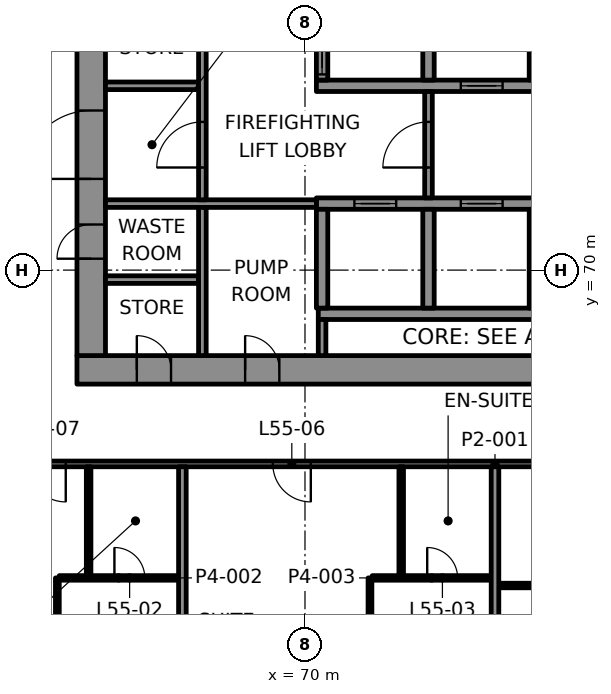
"""IFC4 building model, lengths in metres.
Left out: names, types, materials, properties, quantities, classifications, styles, units other than length and angle.
Written with IfcOpenShell. Run it as: python <this file> out.ifc"""

import sys

from ifc_helpers import new_model, si_unit, direction, frame, frame_2d, origin, place, context, subcontext, project, spatial, rectangle, extrude, element, fill, save


model = new_model("IFC4")
c1 = context("Model", 3, precision=1e-05, world=origin(), true_north=direction((0.0, 1.0)))
c2 = subcontext(c1, "Body", "Model", "MODEL_VIEW")
j1 = project(units=[si_unit("LENGTHUNIT", "METRE"), si_unit("PLANEANGLEUNIT", "RADIAN")], contexts=[c1])
p1 = place(None, origin())
s1 = spatial("IfcSite", under=j1, at=p1, CompositionType="ELEMENT")
p2 = place(p1, origin())
s2 = spatial("IfcBuilding", under=s1, at=p2, CompositionType="ELEMENT")
p3 = place(p2, frame((0.0, 0.0, 233.8)))
s3 = spatial("IfcBuildingStorey", under=s2, at=p3, CompositionType="ELEMENT", Elevation=233.8)
p4 = place(p3, frame((64.0, 67.375, 0.0), z_axis=(0.0, 0.0, 1.0), x_axis=(1.0, 0.0, 0.0)))
e1 = element("IfcWall", 1, at=p4, inside=s3, PredefinedType="SHEAR", context=c2, shape_type="SweptSolid", body=[
    extrude(rectangle(XDim=22.0, YDim=0.75, at=frame_2d((11.0, 0.0))), origin(), (0.0, 0.0, 1.0), 3.7),
])
p5 = place(p4, frame((1.575, 0.0, 0.0)))
e2 = element("IfcOpeningElement", 2, at=p5, cuts=e1, PredefinedType="OPENING", context=c2, shape_type="SweptSolid", body=[
    extrude(rectangle(XDim=0.9, YDim=2.1, at=frame_2d((0.45, 1.05))), frame((0.0, 0.385, 0.0), z_axis=(0.0, -1.0, 0.0), x_axis=(1.0, 0.0, 0.0)), (0.0, 0.0, 1.0), 0.77),
])
p6 = place(p4, frame((4.425, 0.0, 0.0)))
e3 = element("IfcOpeningElement", 3, at=p6, cuts=e1, PredefinedType="OPENING", context=c2, shape_type="SweptSolid", body=[
    extrude(rectangle(XDim=0.9, YDim=2.1, at=frame_2d((0.45, 1.05))), frame((0.0, 0.385, 0.0), z_axis=(0.0, -1.0, 0.0), x_axis=(1.0, 0.0, 0.0)), (0.0, 0.0, 1.0), 0.77),
])
p7 = place(p3, frame((64.375, 67.75, 0.0), z_axis=(0.0, 0.0, 1.0), x_axis=(0.0, 1.0, 0.0)))
e4 = element("IfcWall", 4, at=p7, inside=s3, PredefinedType="SHEAR", context=c2, shape_type="SweptSolid", body=[
    extrude(rectangle(XDim=14.5, YDim=0.75, at=frame_2d((7.25, 0.0))), origin(), (0.0, 0.0, 1.0), 3.7),
])
p8 = place(p7, frame((4.65, 0.0, 0.0)))
e5 = element("IfcOpeningElement", 5, at=p8, cuts=e4, PredefinedType="OPENING", context=c2, shape_type="SweptSolid", body=[
    extrude(rectangle(XDim=1.8, YDim=2.1, at=frame_2d((0.9, 1.05))), frame((0.0, 0.385, 0.0), z_axis=(0.0, -1.0, 0.0), x_axis=(1.0, 0.0, 0.0)), (0.0, 0.0, 1.0), 0.77),
])
p9 = place(p7, frame((2.55, 0.0, 0.0)))
e6 = element("IfcOpeningElement", 6, at=p9, cuts=e4, PredefinedType="OPENING", context=c2, shape_type="SweptSolid", body=[
    extrude(rectangle(XDim=0.9, YDim=2.1, at=frame_2d((0.45, 1.05))), frame((0.0, 0.385, 0.0), z_axis=(0.0, -1.0, 0.0), x_axis=(1.0, 0.0, 0.0)), (0.0, 0.0, 1.0), 0.77),
])
p10 = place(p7, frame((10.35, 0.0, 0.0)))
e7 = element("IfcOpeningElement", 7, at=p10, cuts=e4, PredefinedType="OPENING", context=c2, shape_type="SweptSolid", body=[
    extrude(rectangle(XDim=0.9, YDim=2.1, at=frame_2d((0.45, 1.05))), frame((0.0, 0.385, 0.0), z_axis=(0.0, -1.0, 0.0), x_axis=(1.0, 0.0, 0.0)), (0.0, 0.0, 1.0), 0.77),
])
p11 = place(p3, frame((70.35, 68.85, 0.0), z_axis=(0.0, 0.0, 1.0), x_axis=(1.0, 0.0, 0.0)))
e8 = element("IfcWall", 8, at=p11, inside=s3, PredefinedType="SHEAR", context=c2, shape_type="SweptSolid", body=[
    extrude(rectangle(XDim=14.2, YDim=0.3, at=frame_2d((7.1, 0.0))), origin(), (0.0, 0.0, 1.0), 3.7),
])
p12 = place(p3, frame((70.3, 71.75, 0.0), z_axis=(0.0, 0.0, 1.0), x_axis=(1.0, 0.0, 0.0)))
e9 = element("IfcWall", 9, at=p12, inside=s3, PredefinedType="SHEAR", context=c2, shape_type="SweptSolid", body=[
    extrude(rectangle(XDim=14.3, YDim=0.3, at=frame_2d((7.15, 0.0))), origin(), (0.0, 0.0, 1.0), 3.7),
])
p13 = place(p12, frame((1.0, 0.0, 0.0)))
e10 = element("IfcOpeningElement", 10, at=p13, cuts=e9, PredefinedType="OPENING", context=c2, shape_type="SweptSolid", body=[
    extrude(rectangle(XDim=1.1, YDim=2.1, at=frame_2d((0.55, 1.05))), frame((0.0, 0.16, 0.0), z_axis=(0.0, -1.0, 0.0), x_axis=(1.0, 0.0, 0.0)), (0.0, 0.0, 1.0), 0.32),
])
p14 = place(p12, frame((3.8, 0.0, 0.0)))
e11 = element("IfcOpeningElement", 11, at=p14, cuts=e9, PredefinedType="OPENING", context=c2, shape_type="SweptSolid", body=[
    extrude(rectangle(XDim=1.1, YDim=2.1, at=frame_2d((0.55, 1.05))), frame((0.0, 0.16, 0.0), z_axis=(0.0, -1.0, 0.0), x_axis=(1.0, 0.0, 0.0)), (0.0, 0.0, 1.0), 0.32),
])
p15 = place(p12, frame((6.6, 0.0, 0.0)))
e12 = element("IfcOpeningElement", 12, at=p15, cuts=e9, PredefinedType="OPENING", context=c2, shape_type="SweptSolid", body=[
    extrude(rectangle(XDim=1.1, YDim=2.1, at=frame_2d((0.55, 1.05))), frame((0.0, 0.16, 0.0), z_axis=(0.0, -1.0, 0.0), x_axis=(1.0, 0.0, 0.0)), (0.0, 0.0, 1.0), 0.32),
])
p16 = place(p12, frame((9.4, 0.0, 0.0)))
e13 = element("IfcOpeningElement", 13, at=p16, cuts=e9, PredefinedType="OPENING", context=c2, shape_type="SweptSolid", body=[
    extrude(rectangle(XDim=1.1, YDim=2.1, at=frame_2d((0.55, 1.05))), frame((0.0, 0.16, 0.0), z_axis=(0.0, -1.0, 0.0), x_axis=(1.0, 0.0, 0.0)), (0.0, 0.0, 1.0), 0.32),
])
p17 = place(p12, frame((12.2, 0.0, 0.0)))
e14 = element("IfcOpeningElement", 14, at=p17, cuts=e9, PredefinedType="OPENING", context=c2, shape_type="SweptSolid", body=[
    extrude(rectangle(XDim=1.1, YDim=2.1, at=frame_2d((0.55, 1.05))), frame((0.0, 0.16, 0.0), z_axis=(0.0, -1.0, 0.0), x_axis=(1.0, 0.0, 0.0)), (0.0, 0.0, 1.0), 0.32),
])
p18 = place(p3, frame((70.3, 74.85, 0.0), z_axis=(0.0, 0.0, 1.0), x_axis=(1.0, 0.0, 0.0)))
e15 = element("IfcWall", 15, at=p18, inside=s3, PredefinedType="SHEAR", context=c2, shape_type="SweptSolid", body=[
    extrude(rectangle(XDim=14.3, YDim=0.3, at=frame_2d((7.15, 0.0))), origin(), (0.0, 0.0, 1.0), 3.7),
])
p19 = place(p18, frame((3.8, 0.0, 0.0)))
e16 = element("IfcOpeningElement", 16, at=p19, cuts=e15, PredefinedType="OPENING", context=c2, shape_type="SweptSolid", body=[
    extrude(rectangle(XDim=1.1, YDim=2.1, at=frame_2d((0.55, 1.05))), frame((0.0, 0.16, 0.0), z_axis=(0.0, -1.0, 0.0), x_axis=(1.0, 0.0, 0.0)), (0.0, 0.0, 1.0), 0.32),
])
p20 = place(p18, frame((12.2, 0.0, 0.0)))
e17 = element("IfcOpeningElement", 17, at=p20, cuts=e15, PredefinedType="OPENING", context=c2, shape_type="SweptSolid", body=[
    extrude(rectangle(XDim=1.1, YDim=2.1, at=frame_2d((0.55, 1.05))), frame((0.0, 0.16, 0.0), z_axis=(0.0, -1.0, 0.0), x_axis=(1.0, 0.0, 0.0)), (0.0, 0.0, 1.0), 0.32),
])
p21 = place(p3, frame((70.45, 69.0, 0.0), z_axis=(0.0, 0.0, 1.0), x_axis=(0.0, 1.0, 0.0)))
e18 = element("IfcWall", 18, at=p21, inside=s3, PredefinedType="SHEAR", context=c2, shape_type="SweptSolid", body=[
    extrude(rectangle(XDim=2.6, YDim=0.3, at=frame_2d((1.3, 0.0))), origin(), (0.0, 0.0, 1.0), 3.7),
])
p22 = place(p3, frame((70.45, 75.0, 0.0), z_axis=(0.0, 0.0, 1.0), x_axis=(0.0, 1.0, 0.0)))
e19 = element("IfcWall", 19, at=p22, inside=s3, PredefinedType="SHEAR", context=c2, shape_type="SweptSolid", body=[
    extrude(rectangle(XDim=2.6, YDim=0.3, at=frame_2d((1.3, 0.0))), origin(), (0.0, 0.0, 1.0), 3.7),
])
p23 = place(p22, frame((0.15, 0.0, 0.0)))
e20 = element("IfcOpeningElement", 20, at=p23, cuts=e19, PredefinedType="OPENING", context=c2, shape_type="SweptSolid", body=[
    extrude(rectangle(XDim=1.1, YDim=2.1, at=frame_2d((0.55, 1.05))), frame((0.0, 0.16, 0.0), z_axis=(0.0, -1.0, 0.0), x_axis=(1.0, 0.0, 0.0)), (0.0, 0.0, 1.0), 0.32),
])
for number, where, z_axis, x_axis in (
    (21, (73.25, 69.0, 0.0), (0.0, 0.0, 1.0), (0.0, 1.0, 0.0)),
    (22, (73.25, 75.0, 0.0), (0.0, 0.0, 1.0), (0.0, 1.0, 0.0)),
    (23, (76.05, 69.0, 0.0), (0.0, 0.0, 1.0), (0.0, 1.0, 0.0)),
    (24, (76.05, 75.0, 0.0), (0.0, 0.0, 1.0), (0.0, 1.0, 0.0)),
):
    element("IfcWall", number, at=place(p3, frame(where, z_axis=z_axis, x_axis=x_axis)), inside=s3, PredefinedType="SHEAR", context=c2, shape_type="SweptSolid", body=[
        extrude(rectangle(XDim=2.6, YDim=0.3, at=frame_2d((1.3, 0.0))), origin(), (0.0, 0.0, 1.0), 3.7),
    ])
p24 = place(p3, frame((75.1, 61.7, 0.0), z_axis=(0.0, 0.0, 1.0), x_axis=(1.0, 0.0, 0.0)))
e25 = element("IfcWall", 25, at=p24, inside=s3, PredefinedType="PARTITIONING", context=c2, shape_type="SweptSolid", body=[
    extrude(rectangle(XDim=3.601, YDim=0.12, at=frame_2d((1.801, 0.0))), origin(), (0.0, 0.0, 1.0), 3.1),
])
p25 = place(p24, frame((1.401, 0.0, 0.0)))
e26 = element("IfcOpeningElement", 26, at=p25, cuts=e25, PredefinedType="OPENING", context=c2, shape_type="SweptSolid", body=[
    extrude(rectangle(XDim=0.8, YDim=2.1, at=frame_2d((0.4, 1.05))), frame((0.0, 0.07, 0.0), z_axis=(0.0, -1.0, 0.0), x_axis=(1.0, 0.0, 0.0)), (0.0, 0.0, 1.0), 0.14),
])
p26 = place(p3, frame((63.534, 61.9, 0.0), z_axis=(0.0, 0.0, 1.0), x_axis=(1.0, 0.0, 0.0)))
e27 = element("IfcWall", 27, at=p26, inside=s3, PredefinedType="PARTITIONING", context=c2, shape_type="SweptSolid", body=[
    extrude(rectangle(XDim=3.13, YDim=0.12, at=frame_2d((1.565, 0.0))), origin(), (0.0, 0.0, 1.0), 3.1),
])
p27 = place(p26, frame((1.451, 0.0, 0.0)))
e28 = element("IfcOpeningElement", 28, at=p27, cuts=e27, PredefinedType="OPENING", context=c2, shape_type="SweptSolid", body=[
    extrude(rectangle(XDim=0.8, YDim=2.1, at=frame_2d((0.4, 1.05))), frame((0.0, 0.07, 0.0), z_axis=(0.0, -1.0, 0.0), x_axis=(1.0, 0.0, 0.0)), (0.0, 0.0, 1.0), 0.14),
])
p28 = place(p3, frame((71.77, 61.9, 0.0), z_axis=(0.0, 0.0, 1.0), x_axis=(1.0, 0.0, 0.0)))
e29 = element("IfcWall", 29, at=p28, inside=s3, PredefinedType="PARTITIONING", context=c2, shape_type="SweptSolid", body=[
    extrude(rectangle(XDim=3.13, YDim=0.12, at=frame_2d((1.565, 0.0))), origin(), (0.0, 0.0, 1.0), 3.1),
])
p29 = place(p28, frame((1.446, 0.0, 0.0)))
e30 = element("IfcOpeningElement", 30, at=p29, cuts=e29, PredefinedType="OPENING", context=c2, shape_type="SweptSolid", body=[
    extrude(rectangle(XDim=0.8, YDim=2.1, at=frame_2d((0.4, 1.05))), frame((0.0, 0.07, 0.0), z_axis=(0.0, -1.0, 0.0), x_axis=(1.0, 0.0, 0.0)), (0.0, 0.0, 1.0), 0.14),
])
p30 = place(p3, frame((88.099, 64.9, 0.0), z_axis=(0.0, 0.0, 1.0), x_axis=(-1.0, 0.0, 0.0)))
e31 = element("IfcWall", 31, at=p30, inside=s3, PredefinedType="PARTITIONING", context=c2, shape_type="SweptSolid", body=[
    extrude(rectangle(XDim=26.199, YDim=0.15, at=frame_2d((13.1, 0.0))), origin(), (0.0, 0.0, 1.0), 3.1),
])
p31 = place(p30, frame((2.088, 0.0, 0.0)))
e32 = element("IfcOpeningElement", 32, at=p31, cuts=e31, PredefinedType="OPENING", context=c2, shape_type="SweptSolid", body=[
    extrude(rectangle(XDim=0.9, YDim=2.1, at=frame_2d((0.45, 1.05))), frame((0.0, 0.085, 0.0), z_axis=(0.0, -1.0, 0.0), x_axis=(1.0, 0.0, 0.0)), (0.0, 0.0, 1.0), 0.17),
])
p32 = place(p30, frame((5.4, 0.0, 0.0)))
e33 = element("IfcOpeningElement", 33, at=p32, cuts=e31, PredefinedType="OPENING", context=c2, shape_type="SweptSolid", body=[
    extrude(rectangle(XDim=1.0, YDim=2.1, at=frame_2d((0.5, 1.05))), frame((0.0, 0.085, 0.0), z_axis=(0.0, -1.0, 0.0), x_axis=(1.0, 0.0, 0.0)), (0.0, 0.0, 1.0), 0.17),
])
p33 = place(p30, frame((17.946, 0.0, 0.0)))
e34 = element("IfcOpeningElement", 34, at=p33, cuts=e31, PredefinedType="OPENING", context=c2, shape_type="SweptSolid", body=[
    extrude(rectangle(XDim=1.0, YDim=2.1, at=frame_2d((0.5, 1.05))), frame((0.0, 0.085, 0.0), z_axis=(0.0, -1.0, 0.0), x_axis=(1.0, 0.0, 0.0)), (0.0, 0.0, 1.0), 0.17),
])
p34 = place(p30, frame((24.395, 0.0, 0.0)))
e35 = element("IfcOpeningElement", 35, at=p34, cuts=e31, PredefinedType="OPENING", context=c2, shape_type="SweptSolid", body=[
    extrude(rectangle(XDim=1.0, YDim=2.1, at=frame_2d((0.5, 1.05))), frame((0.0, 0.085, 0.0), z_axis=(0.0, -1.0, 0.0), x_axis=(1.0, 0.0, 0.0)), (0.0, 0.0, 1.0), 0.17),
])
p35 = place(p3, frame((75.0, 57.997, 0.0), z_axis=(0.0, 0.0, 1.0), x_axis=(0.0, 1.0, 0.0)))
e36 = element("IfcWall", 36, at=p35, inside=s3, PredefinedType="PARTITIONING", context=c2, shape_type="SweptSolid", body=[
    extrude(rectangle(XDim=6.828, YDim=0.2, at=frame_2d((3.414, 0.0))), origin(), (0.0, 0.0, 1.0), 3.1),
])
p36 = place(p3, frame((72.532, 61.96, 0.0), z_axis=(0.0, 0.0, 1.0), x_axis=(0.0, 1.0, 0.0)))
e37 = element("IfcWall", 37, at=p36, inside=s3, PredefinedType="PARTITIONING", context=c2, shape_type="SweptSolid", body=[
    extrude(rectangle(XDim=2.865, YDim=0.12, at=frame_2d((1.433, 0.0))), origin(), (0.0, 0.0, 1.0), 3.1),
])
p37 = place(p3, frame((71.71, 61.9, 0.0), z_axis=(0.0, 0.0, 1.0), x_axis=(0.0, -1.0, 0.0)))
e38 = element("IfcWall", 38, at=p37, inside=s3, PredefinedType="PARTITIONING", context=c2, shape_type="SweptSolid", body=[
    extrude(rectangle(XDim=5.364, YDim=0.1, at=frame_2d((2.682, 0.0))), origin(), (0.0, 0.0, 1.0), 3.022),
])
p38 = place(p37, frame((2.052, 0.0, 0.0)))
e39 = element("IfcOpeningElement", 39, at=p38, cuts=e38, PredefinedType="OPENING", context=c2, shape_type="SweptSolid", body=[
    extrude(rectangle(XDim=0.9, YDim=2.1, at=frame_2d((0.45, 1.05))), frame((0.0, 0.06, 0.0), z_axis=(0.0, -1.0, 0.0), x_axis=(1.0, 0.0, 0.0)), (0.0, 0.0, 1.0), 0.12),
])
p39 = place(p3, frame((66.774, 57.997, 0.0), z_axis=(0.0, 0.0, 1.0), x_axis=(0.0, 1.0, 0.0)))
e40 = element("IfcWall", 40, at=p39, inside=s3, PredefinedType="PARTITIONING", context=c2, shape_type="SweptSolid", body=[
    extrude(rectangle(XDim=6.828, YDim=0.2, at=frame_2d((3.414, 0.0))), origin(), (0.0, 0.0, 1.0), 3.1),
])
p40 = place(p3, frame((64.307, 61.96, 0.0), z_axis=(0.0, 0.0, 1.0), x_axis=(0.0, 1.0, 0.0)))
e41 = element("IfcWall", 41, at=p40, inside=s3, PredefinedType="PARTITIONING", context=c2, shape_type="SweptSolid", body=[
    extrude(rectangle(XDim=2.865, YDim=0.12, at=frame_2d((1.433, 0.0))), origin(), (0.0, 0.0, 1.0), 3.1),
])
p41 = place(p3, frame((63.484, 61.9, 0.0), z_axis=(0.0, 0.0, 1.0), x_axis=(0.0, -1.0, 0.0)))
e42 = element("IfcWall", 42, at=p41, inside=s3, PredefinedType="PARTITIONING", context=c2, shape_type="SweptSolid", body=[
    extrude(rectangle(XDim=5.364, YDim=0.1, at=frame_2d((2.682, 0.0))), origin(), (0.0, 0.0, 1.0), 3.022),
])
p42 = place(p41, frame((2.052, 0.0, 0.0)))
e43 = element("IfcOpeningElement", 43, at=p42, cuts=e42, PredefinedType="OPENING", context=c2, shape_type="SweptSolid", body=[
    extrude(rectangle(XDim=0.9, YDim=2.1, at=frame_2d((0.45, 1.05))), frame((0.0, 0.06, 0.0), z_axis=(0.0, -1.0, 0.0), x_axis=(1.0, 0.0, 0.0)), (0.0, 0.0, 1.0), 0.12),
])
p43 = place(p3, frame((64.75, 69.75, 0.0), z_axis=(0.0, 0.0, 1.0), x_axis=(1.0, 0.0, 0.0)))
e44 = element("IfcWall", 44, at=p43, inside=s3, PredefinedType="PARTITIONING", context=c2, shape_type="SweptSolid", body=[
    extrude(rectangle(XDim=2.45, YDim=0.2, at=frame_2d((1.225, 0.0))), origin(), (0.0, 0.0, 1.0), 3.7),
])
p44 = place(p3, frame((64.75, 71.75, 0.0), z_axis=(0.0, 0.0, 1.0), x_axis=(1.0, 0.0, 0.0)))
e45 = element("IfcWall", 45, at=p44, inside=s3, PredefinedType="PARTITIONING", context=c2, shape_type="SweptSolid", body=[
    extrude(rectangle(XDim=5.55, YDim=0.2, at=frame_2d((2.775, 0.0))), origin(), (0.0, 0.0, 1.0), 3.7),
])
p45 = place(p3, frame((64.75, 74.85, 0.0), z_axis=(0.0, 0.0, 1.0), x_axis=(1.0, 0.0, 0.0)))
e46 = element("IfcWall", 46, at=p45, inside=s3, PredefinedType="PARTITIONING", context=c2, shape_type="SweptSolid", body=[
    extrude(rectangle(XDim=2.45, YDim=0.2, at=frame_2d((1.225, 0.0))), origin(), (0.0, 0.0, 1.0), 3.7),
])
p46 = place(p3, frame((67.3, 67.75, 0.0), z_axis=(0.0, 0.0, 1.0), x_axis=(0.0, 1.0, 0.0)))
e47 = element("IfcWall", 47, at=p46, inside=s3, PredefinedType="PARTITIONING", context=c2, shape_type="SweptSolid", body=[
    extrude(rectangle(XDim=3.9, YDim=0.2, at=frame_2d((1.95, 0.0))), origin(), (0.0, 0.0, 1.0), 3.7),
])
p47 = place(p3, frame((67.3, 71.85, 0.0), z_axis=(0.0, 0.0, 1.0), x_axis=(0.0, 1.0, 0.0)))
e48 = element("IfcWall", 48, at=p47, inside=s3, PredefinedType="PARTITIONING", context=c2, shape_type="SweptSolid", body=[
    extrude(rectangle(XDim=5.75, YDim=0.2, at=frame_2d((2.875, 0.0))), origin(), (0.0, 0.0, 1.0), 3.7),
])
p48 = place(p47, frame((0.85, 0.0, 0.0)))
e49 = element("IfcOpeningElement", 49, at=p48, cuts=e48, PredefinedType="OPENING", context=c2, shape_type="SweptSolid", body=[
    extrude(rectangle(XDim=1.2, YDim=2.1, at=frame_2d((0.6, 1.05))), frame((0.0, 0.11, 0.0), z_axis=(0.0, -1.0, 0.0), x_axis=(1.0, 0.0, 0.0)), (0.0, 0.0, 1.0), 0.22),
])
p49 = place(p3, frame((70.45, 67.75, 0.0), z_axis=(0.0, 0.0, 1.0), x_axis=(0.0, 1.0, 0.0)))
e50 = element("IfcWall", 50, at=p49, inside=s3, PredefinedType="PARTITIONING", context=c2, shape_type="SweptSolid", body=[
    extrude(rectangle(XDim=0.95, YDim=0.2, at=frame_2d((0.475, 0.0))), origin(), (0.0, 0.0, 1.0), 3.7),
])
p50 = place(p3, frame((73.25, 71.9, 0.0), z_axis=(0.0, 0.0, 1.0), x_axis=(0.0, 1.0, 0.0)))
e51 = element("IfcWall", 51, at=p50, inside=s3, PredefinedType="PARTITIONING", context=c2, shape_type="SweptSolid", body=[
    extrude(rectangle(XDim=2.8, YDim=0.2, at=frame_2d((1.4, 0.0))), origin(), (0.0, 0.0, 1.0), 3.7),
])
p51 = place(p50, frame((0.8, 0.0, 0.0)))
e52 = element("IfcOpeningElement", 52, at=p51, cuts=e51, PredefinedType="OPENING", context=c2, shape_type="SweptSolid", body=[
    extrude(rectangle(XDim=1.2, YDim=2.1, at=frame_2d((0.6, 1.05))), frame((0.0, 0.11, 0.0), z_axis=(0.0, -1.0, 0.0), x_axis=(1.0, 0.0, 0.0)), (0.0, 0.0, 1.0), 0.22),
])
p52 = place(p27, origin())
e53 = element("IfcDoor", 53, at=p52, inside=s3, OperationType="SINGLE_SWING_RIGHT", PredefinedType="DOOR", context=c2, shape_type="SweptSolid", body=[
    extrude(rectangle(XDim=0.8, YDim=2.1, at=frame_2d((0.4, 1.05))), frame((0.0, 0.025, 0.0), z_axis=(0.0, -1.0, 0.0), x_axis=(1.0, 0.0, 0.0)), (0.0, 0.0, 1.0), 0.05),
])
fill(e28, e53)
p53 = place(p29, origin())
e54 = element("IfcDoor", 54, at=p53, inside=s3, OperationType="SINGLE_SWING_LEFT", PredefinedType="DOOR", context=c2, shape_type="SweptSolid", body=[
    extrude(rectangle(XDim=0.8, YDim=2.1, at=frame_2d((0.4, 1.05))), frame((0.0, 0.025, 0.0), z_axis=(0.0, -1.0, 0.0), x_axis=(1.0, 0.0, 0.0)), (0.0, 0.0, 1.0), 0.05),
])
fill(e30, e54)
p54 = place(p33, origin())
e55 = element("IfcDoor", 55, at=p54, inside=s3, OperationType="SINGLE_SWING_RIGHT", PredefinedType="DOOR", context=c2, shape_type="SweptSolid", body=[
    extrude(rectangle(XDim=1.0, YDim=2.1, at=frame_2d((0.5, 1.05))), frame((0.0, 0.025, 0.0), z_axis=(0.0, -1.0, 0.0), x_axis=(1.0, 0.0, 0.0)), (0.0, 0.0, 1.0), 0.05),
])
fill(e34, e55)
p55 = place(p34, origin())
e56 = element("IfcDoor", 56, at=p55, inside=s3, OperationType="SINGLE_SWING_LEFT", PredefinedType="DOOR", context=c2, shape_type="SweptSolid", body=[
    extrude(rectangle(XDim=1.0, YDim=2.1, at=frame_2d((0.5, 1.05))), frame((0.0, 0.025, 0.0), z_axis=(0.0, -1.0, 0.0), x_axis=(1.0, 0.0, 0.0)), (0.0, 0.0, 1.0), 0.05),
])
fill(e35, e56)
p56 = place(p13, origin())
e57 = element("IfcDoor", 57, at=p56, inside=s3, OperationType="DOUBLE_DOOR_SLIDING", PredefinedType="DOOR", context=c2, shape_type="SweptSolid", body=[
    extrude(rectangle(XDim=1.1, YDim=2.1, at=frame_2d((0.55, 1.05))), frame((0.0, 0.025, 0.0), z_axis=(0.0, -1.0, 0.0), x_axis=(1.0, 0.0, 0.0)), (0.0, 0.0, 1.0), 0.05),
])
fill(e10, e57)
p57 = place(p14, origin())
e58 = element("IfcDoor", 58, at=p57, inside=s3, OperationType="DOUBLE_DOOR_SLIDING", PredefinedType="DOOR", context=c2, shape_type="SweptSolid", body=[
    extrude(rectangle(XDim=1.1, YDim=2.1, at=frame_2d((0.55, 1.05))), frame((0.0, 0.025, 0.0), z_axis=(0.0, -1.0, 0.0), x_axis=(1.0, 0.0, 0.0)), (0.0, 0.0, 1.0), 0.05),
])
fill(e11, e58)
p58 = place(p23, origin())
e59 = element("IfcDoor", 59, at=p58, inside=s3, OperationType="DOUBLE_DOOR_SLIDING", PredefinedType="DOOR", context=c2, shape_type="SweptSolid", body=[
    extrude(rectangle(XDim=1.1, YDim=2.1, at=frame_2d((0.55, 1.05))), frame((0.0, 0.025, 0.0), z_axis=(0.0, -1.0, 0.0), x_axis=(1.0, 0.0, 0.0)), (0.0, 0.0, 1.0), 0.05),
])
fill(e20, e59)
p59 = place(p19, origin())
e60 = element("IfcDoor", 60, at=p59, inside=s3, OperationType="DOUBLE_DOOR_SLIDING", PredefinedType="DOOR", context=c2, shape_type="SweptSolid", body=[
    extrude(rectangle(XDim=1.1, YDim=2.1, at=frame_2d((0.55, 1.05))), frame((0.0, 0.025, 0.0), z_axis=(0.0, -1.0, 0.0), x_axis=(1.0, 0.0, 0.0)), (0.0, 0.0, 1.0), 0.05),
])
fill(e16, e60)
p60 = place(p51, origin())
e61 = element("IfcDoor", 61, at=p60, inside=s3, OperationType="SINGLE_SWING_LEFT", PredefinedType="DOOR", context=c2, shape_type="SweptSolid", body=[
    extrude(rectangle(XDim=1.2, YDim=2.1, at=frame_2d((0.6, 1.05))), frame((0.0, 0.025, 0.0), z_axis=(0.0, -1.0, 0.0), x_axis=(1.0, 0.0, 0.0)), (0.0, 0.0, 1.0), 0.05),
])
fill(e52, e61)
p61 = place(p48, origin())
e62 = element("IfcDoor", 62, at=p61, inside=s3, OperationType="SINGLE_SWING_RIGHT", PredefinedType="DOOR", context=c2, shape_type="SweptSolid", body=[
    extrude(rectangle(XDim=1.2, YDim=2.1, at=frame_2d((0.6, 1.05))), frame((0.0, 0.025, 0.0), z_axis=(0.0, -1.0, 0.0), x_axis=(1.0, 0.0, 0.0)), (0.0, 0.0, 1.0), 0.05),
])
fill(e49, e62)
p62 = place(p8, origin())
e63 = element("IfcDoor", 63, at=p62, inside=s3, OperationType="SINGLE_SWING_LEFT", PredefinedType="DOOR", context=c2, shape_type="SweptSolid", body=[
    extrude(rectangle(XDim=1.8, YDim=2.1, at=frame_2d((0.9, 1.05))), frame((0.0, 0.095, 0.0), z_axis=(0.0, -1.0, 0.0), x_axis=(1.0, 0.0, 0.0)), (0.0, 0.0, 1.0), 0.19),
])
fill(e5, e63)
p63 = place(p5, origin())
e64 = element("IfcDoor", 64, at=p63, inside=s3, OperationType="SINGLE_SWING_LEFT", PredefinedType="DOOR", context=c2, shape_type="SweptSolid", body=[
    extrude(rectangle(XDim=0.9, YDim=2.1, at=frame_2d((0.45, 1.05))), frame((0.0, 0.095, 0.0), z_axis=(0.0, -1.0, 0.0), x_axis=(1.0, 0.0, 0.0)), (0.0, 0.0, 1.0), 0.19),
])
fill(e2, e64)
p64 = place(p9, origin())
e65 = element("IfcDoor", 65, at=p64, inside=s3, OperationType="SINGLE_SWING_RIGHT", PredefinedType="DOOR", context=c2, shape_type="SweptSolid", body=[
    extrude(rectangle(XDim=0.9, YDim=2.1, at=frame_2d((0.45, 1.05))), frame((0.0, 0.095, 0.0), z_axis=(0.0, -1.0, 0.0), x_axis=(1.0, 0.0, 0.0)), (0.0, 0.0, 1.0), 0.19),
])
fill(e6, e65)
p65 = place(p6, origin())
e66 = element("IfcDoor", 66, at=p65, inside=s3, OperationType="SINGLE_SWING_LEFT", PredefinedType="DOOR", context=c2, shape_type="SweptSolid", body=[
    extrude(rectangle(XDim=0.9, YDim=2.1, at=frame_2d((0.45, 1.05))), frame((0.0, 0.095, 0.0), z_axis=(0.0, -1.0, 0.0), x_axis=(1.0, 0.0, 0.0)), (0.0, 0.0, 1.0), 0.19),
])
fill(e3, e66)
save(model, sys.argv[1])
